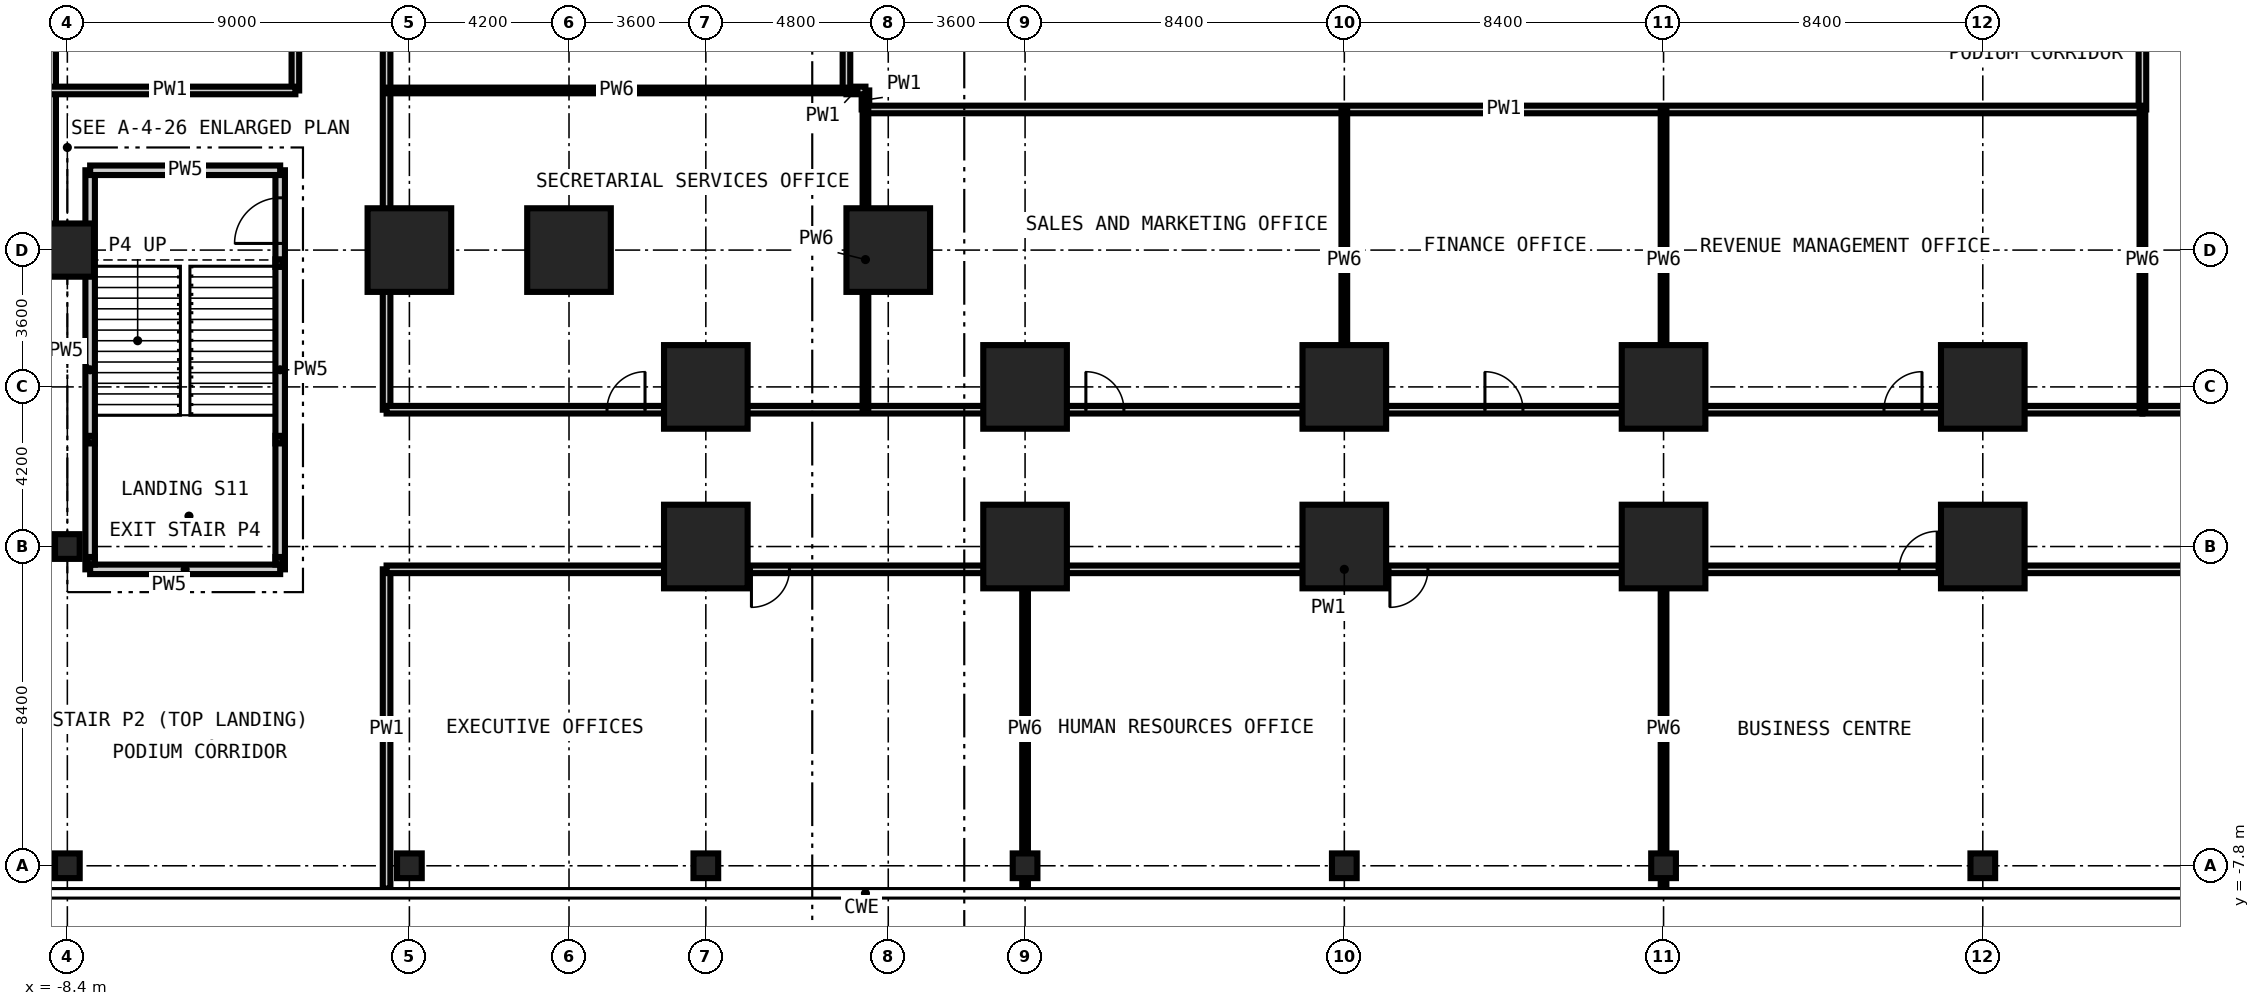
"""IFC4 building model, lengths in metres.
Left out: names, types, materials, properties, quantities, classifications, styles, units other than length and angle.
Written with IfcOpenShell. Run it as: python <this file> out.ifc"""

import sys

from ifc_helpers import new_model, si_unit, direction, frame, frame_2d, origin, origin_with_axes, origin_2d, place, context, subcontext, project, spatial, rectangle, hollow_rectangle, extrude, element, fill, save


model = new_model("IFC4")
c1 = context("Model", 3, precision=1e-05, world=origin(), true_north=direction((0.0, 1.0)))
c2 = subcontext(c1, "Body", "Model", "MODEL_VIEW")
j1 = project(units=[si_unit("LENGTHUNIT", "METRE"), si_unit("PLANEANGLEUNIT", "RADIAN")], contexts=[c1])
p1 = place(None, origin())
s1 = spatial("IfcSite", under=j1, at=p1, CompositionType="ELEMENT")
p2 = place(p1, origin())
s2 = spatial("IfcBuilding", under=s1, at=p2, CompositionType="ELEMENT")
p3 = place(p2, frame((0.0, 0.0, 12.0)))
s3 = spatial("IfcBuildingStorey", under=s2, at=p3, CompositionType="ELEMENT", Elevation=12.0)
for number, where, z_axis, x_axis in (
    (1, (0.6, 8.4, -0.3), (0.0, 0.0, 1.0), (1.0, 0.0, 0.0)),
    (2, (4.8, 8.4, -0.3), (0.0, 0.0, 1.0), (1.0, 0.0, 0.0)),
    (3, (8.4, 0.6, -0.3), (0.0, 0.0, 1.0), (1.0, 0.0, 0.0)),
    (4, (8.4, 4.8, -0.3), (0.0, 0.0, 1.0), (1.0, 0.0, 0.0)),
    (5, (13.2, 8.4, -0.3), (0.0, 0.0, 1.0), (1.0, 0.0, 0.0)),
    (6, (16.8, 0.6, -0.3), (0.0, 0.0, 1.0), (1.0, 0.0, 0.0)),
    (7, (16.8, 4.8, -0.3), (0.0, 0.0, 1.0), (1.0, 0.0, 0.0)),
    (8, (25.2, 0.6, -0.3), (0.0, 0.0, 1.0), (1.0, 0.0, 0.0)),
    (9, (25.2, 4.8, -0.3), (0.0, 0.0, 1.0), (1.0, 0.0, 0.0)),
    (10, (33.6, 0.6, -0.3), (0.0, 0.0, 1.0), (1.0, 0.0, 0.0)),
    (11, (33.6, 4.8, -0.3), (0.0, 0.0, 1.0), (1.0, 0.0, 0.0)),
    (12, (42.0, 0.6, -0.3), (0.0, 0.0, 1.0), (1.0, 0.0, 0.0)),
    (13, (42.0, 4.8, -0.3), (0.0, 0.0, 1.0), (1.0, 0.0, 0.0)),
):
    element("IfcColumn", number, at=place(p3, frame(where, z_axis=z_axis, x_axis=x_axis)), inside=s3, PredefinedType="COLUMN", context=c2, shape_type="SweptSolid", body=[
        extrude(rectangle(XDim=2.2, YDim=2.2, at=origin_2d()), origin(), (0.0, 0.0, 1.0), 5.0),
    ])
for number, where, z_axis, x_axis in (
    (14, (-8.4, -7.8, -0.3), (0.0, 0.0, 1.0), (1.0, 0.0, 0.0)),
    (15, (-8.4, 0.6, -0.3), (0.0, 0.0, 1.0), (1.0, 0.0, 0.0)),
):
    element("IfcColumn", number, at=place(p3, frame(where, z_axis=z_axis, x_axis=x_axis)), inside=s3, PredefinedType="COLUMN", context=c2, shape_type="SweptSolid", body=[
        extrude(rectangle(XDim=0.65, YDim=0.65, at=origin_2d()), origin(), (0.0, 0.0, 1.0), 5.0),
    ])
p4 = place(p3, frame((-8.4, 8.4, -0.3), z_axis=(0.0, 0.0, 1.0), x_axis=(1.0, 0.0, 0.0)))
e16 = element("IfcColumn", 16, at=p4, inside=s3, PredefinedType="COLUMN", context=c2, shape_type="SweptSolid", body=[
    extrude(rectangle(XDim=1.4, YDim=1.4, at=origin_2d()), origin(), (0.0, 0.0, 1.0), 5.0),
])
for number, where, z_axis, x_axis in (
    (17, (0.6, -7.8, -0.3), (0.0, 0.0, 1.0), (1.0, 0.0, 0.0)),
    (18, (8.4, -7.8, -0.3), (0.0, 0.0, 1.0), (1.0, 0.0, 0.0)),
    (19, (16.8, -7.8, -0.3), (0.0, 0.0, 1.0), (1.0, 0.0, 0.0)),
    (20, (25.2, -7.8, -0.3), (0.0, 0.0, 1.0), (1.0, 0.0, 0.0)),
    (21, (33.6, -7.8, -0.3), (0.0, 0.0, 1.0), (1.0, 0.0, 0.0)),
    (22, (42.0, -7.8, -0.3), (0.0, 0.0, 1.0), (1.0, 0.0, 0.0)),
):
    element("IfcColumn", number, at=place(p3, frame(where, z_axis=z_axis, x_axis=x_axis)), inside=s3, PredefinedType="COLUMN", context=c2, shape_type="SweptSolid", body=[
        extrude(rectangle(XDim=0.65, YDim=0.65, at=origin_2d()), origin(), (0.0, 0.0, 1.0), 5.0),
    ])
p5 = place(p3, frame((-8.85, 42.0, 0.0), z_axis=(0.0, 0.0, 1.0), x_axis=(0.0, -1.0, 0.0)))
e23 = element("IfcWall", 23, at=p5, inside=s3, PredefinedType="PARTITIONING", context=c2, shape_type="SweptSolid", body=[
    extrude(rectangle(XDim=33.6, YDim=0.3, at=frame_2d((16.8, 0.0))), origin(), (0.0, 0.0, 1.0), 4.7),
])
p6 = place(p3, frame((0.0, -8.4, 0.0), z_axis=(0.0, 0.0, 1.0), x_axis=(0.0, 1.0, 0.0)))
e24 = element("IfcWall", 24, at=p6, inside=s3, PredefinedType="PARTITIONING", context=c2, shape_type="SweptSolid", body=[
    extrude(rectangle(XDim=8.4, YDim=0.2, at=frame_2d((4.2, 0.0))), origin(), (0.0, 0.0, 1.0), 4.7),
])
p7 = place(p3, frame((0.0, 4.2, 0.0), z_axis=(0.0, 0.0, 1.0), x_axis=(0.0, 1.0, 0.0)))
e25 = element("IfcWall", 25, at=p7, inside=s3, PredefinedType="PARTITIONING", context=c2, shape_type="SweptSolid", body=[
    extrude(rectangle(XDim=33.6, YDim=0.2, at=frame_2d((16.8, 0.0))), origin(), (0.0, 0.0, 1.0), 4.7),
])
p8 = place(p7, frame((13.8, 0.0, 0.0)))
e26 = element("IfcOpeningElement", 26, at=p8, cuts=e25, PredefinedType="OPENING", context=c2, shape_type="SweptSolid", body=[
    extrude(rectangle(XDim=1.8, YDim=2.4, at=frame_2d((0.9, 1.2))), frame((0.0, 0.11, 0.0), z_axis=(0.0, -1.0, 0.0), x_axis=(1.0, 0.0, 0.0)), (0.0, 0.0, 1.0), 0.22),
])
p9 = place(p3, frame((12.6, 12.1, 0.0), z_axis=(0.0, 0.0, 1.0), x_axis=(0.0, 1.0, 0.0)))
e27 = element("IfcWall", 27, at=p9, inside=s3, PredefinedType="PARTITIONING", context=c2, shape_type="SweptSolid", body=[
    extrude(rectangle(XDim=0.5, YDim=0.2, at=frame_2d((0.25, 0.0))), origin(), (0.0, 0.0, 1.0), 4.7),
])
p10 = place(p3, frame((46.2, 12.1, 0.0), z_axis=(0.0, 0.0, 1.0), x_axis=(0.0, 1.0, 0.0)))
e28 = element("IfcWall", 28, at=p10, inside=s3, PredefinedType="PARTITIONING", context=c2, shape_type="SweptSolid", body=[
    extrude(rectangle(XDim=4.7, YDim=0.2, at=frame_2d((2.35, 0.0))), origin(), (0.0, 0.0, 1.0), 4.7),
])
p11 = place(p3, origin_with_axes())
e29 = element("IfcWall", 29, at=p11, inside=s3, PredefinedType="PARTITIONING", context=c2, shape_type="SweptSolid", body=[
    extrude(rectangle(XDim=50.4, YDim=0.2, at=frame_2d((25.2, 0.0))), origin(), (0.0, 0.0, 1.0), 4.7),
])
p12 = place(p11, frame((9.6, 0.0, 0.0)))
e30 = element("IfcOpeningElement", 30, at=p12, cuts=e29, PredefinedType="OPENING", context=c2, shape_type="SweptSolid", body=[
    extrude(rectangle(XDim=1.0, YDim=2.1, at=frame_2d((0.5, 1.05))), frame((0.0, 0.11, 0.0), z_axis=(0.0, -1.0, 0.0), x_axis=(1.0, 0.0, 0.0)), (0.0, 0.0, 1.0), 0.22),
])
p13 = place(p11, frame((26.4, 0.0, 0.0)))
e31 = element("IfcOpeningElement", 31, at=p13, cuts=e29, PredefinedType="OPENING", context=c2, shape_type="SweptSolid", body=[
    extrude(rectangle(XDim=1.0, YDim=2.1, at=frame_2d((0.5, 1.05))), frame((0.0, 0.11, 0.0), z_axis=(0.0, -1.0, 0.0), x_axis=(1.0, 0.0, 0.0)), (0.0, 0.0, 1.0), 0.22),
])
p14 = place(p11, frame((39.8, 0.0, 0.0)))
e32 = element("IfcOpeningElement", 32, at=p14, cuts=e29, PredefinedType="OPENING", context=c2, shape_type="SweptSolid", body=[
    extrude(rectangle(XDim=1.0, YDim=2.1, at=frame_2d((0.5, 1.05))), frame((0.0, 0.11, 0.0), z_axis=(0.0, -1.0, 0.0), x_axis=(1.0, 0.0, 0.0)), (0.0, 0.0, 1.0), 0.22),
])
p15 = place(p3, frame((0.0, 4.2, 0.0), z_axis=(0.0, 0.0, 1.0), x_axis=(1.0, 0.0, 0.0)))
e33 = element("IfcWall", 33, at=p15, inside=s3, PredefinedType="PARTITIONING", context=c2, shape_type="SweptSolid", body=[
    extrude(rectangle(XDim=46.2, YDim=0.2, at=frame_2d((23.1, 0.0))), origin(), (0.0, 0.0, 1.0), 4.7),
])
p16 = place(p15, frame((5.8, 0.0, 0.0)))
e34 = element("IfcOpeningElement", 34, at=p16, cuts=e33, PredefinedType="OPENING", context=c2, shape_type="SweptSolid", body=[
    extrude(rectangle(XDim=1.0, YDim=2.1, at=frame_2d((0.5, 1.05))), frame((0.0, 0.11, 0.0), z_axis=(0.0, -1.0, 0.0), x_axis=(1.0, 0.0, 0.0)), (0.0, 0.0, 1.0), 0.22),
])
p17 = place(p15, frame((18.4, 0.0, 0.0)))
e35 = element("IfcOpeningElement", 35, at=p17, cuts=e33, PredefinedType="OPENING", context=c2, shape_type="SweptSolid", body=[
    extrude(rectangle(XDim=1.0, YDim=2.1, at=frame_2d((0.5, 1.05))), frame((0.0, 0.11, 0.0), z_axis=(0.0, -1.0, 0.0), x_axis=(1.0, 0.0, 0.0)), (0.0, 0.0, 1.0), 0.22),
])
p18 = place(p15, frame((28.9, 0.0, 0.0)))
e36 = element("IfcOpeningElement", 36, at=p18, cuts=e33, PredefinedType="OPENING", context=c2, shape_type="SweptSolid", body=[
    extrude(rectangle(XDim=1.0, YDim=2.1, at=frame_2d((0.5, 1.05))), frame((0.0, 0.11, 0.0), z_axis=(0.0, -1.0, 0.0), x_axis=(1.0, 0.0, 0.0)), (0.0, 0.0, 1.0), 0.22),
])
p19 = place(p15, frame((39.4, 0.0, 0.0)))
e37 = element("IfcOpeningElement", 37, at=p19, cuts=e33, PredefinedType="OPENING", context=c2, shape_type="SweptSolid", body=[
    extrude(rectangle(XDim=1.0, YDim=2.1, at=frame_2d((0.5, 1.05))), frame((0.0, 0.11, 0.0), z_axis=(0.0, -1.0, 0.0), x_axis=(1.0, 0.0, 0.0)), (0.0, 0.0, 1.0), 0.22),
])
p20 = place(p3, frame((12.6, 12.1, 0.0), z_axis=(0.0, 0.0, 1.0), x_axis=(1.0, 0.0, 0.0)))
e38 = element("IfcWall", 38, at=p20, inside=s3, PredefinedType="PARTITIONING", context=c2, shape_type="SweptSolid", body=[
    extrude(rectangle(XDim=33.6, YDim=0.2, at=frame_2d((16.8, 0.0))), origin(), (0.0, 0.0, 1.0), 4.7),
])
p21 = place(p3, frame((12.1, 12.6, 0.0), z_axis=(0.0, 0.0, 1.0), x_axis=(1.0, 0.0, 0.0)))
e39 = element("IfcWall", 39, at=p21, inside=s3, PredefinedType="PARTITIONING", context=c2, shape_type="SweptSolid", body=[
    extrude(rectangle(XDim=0.5, YDim=0.2, at=frame_2d((0.25, 0.0))), origin(), (0.0, 0.0, 1.0), 4.7),
])
p22 = place(p3, frame((-2.4, 25.2, 0.0), z_axis=(0.0, 0.0, 1.0), x_axis=(0.0, -1.0, 0.0)))
e40 = element("IfcWall", 40, at=p22, inside=s3, PredefinedType="PARTITIONING", context=c2, shape_type="SweptSolid", body=[
    extrude(rectangle(XDim=12.6, YDim=0.2, at=frame_2d((6.3, 0.0))), origin(), (0.0, 0.0, 1.0), 4.7),
])
p23 = place(p22, frame((5.8, 0.0, 0.0)))
e41 = element("IfcOpeningElement", 41, at=p23, cuts=e40, PredefinedType="OPENING", context=c2, shape_type="SweptSolid", body=[
    extrude(rectangle(XDim=1.0, YDim=2.1, at=frame_2d((0.5, 1.05))), frame((0.0, 0.11, 0.0), z_axis=(0.0, -1.0, 0.0), x_axis=(1.0, 0.0, 0.0)), (0.0, 0.0, 1.0), 0.22),
])
p24 = place(p3, frame((12.1, 37.8, 0.0), z_axis=(0.0, 0.0, 1.0), x_axis=(0.0, -1.0, 0.0)))
e42 = element("IfcWall", 42, at=p24, inside=s3, PredefinedType="PARTITIONING", context=c2, shape_type="SweptSolid", body=[
    extrude(rectangle(XDim=25.2, YDim=0.2, at=frame_2d((12.6, 0.0))), origin(), (0.0, 0.0, 1.0), 4.7),
])
p25 = place(p24, frame((5.4, 0.0, 0.0)))
e43 = element("IfcOpeningElement", 43, at=p25, cuts=e42, PredefinedType="OPENING", context=c2, shape_type="SweptSolid", body=[
    extrude(rectangle(XDim=1.8, YDim=2.4, at=frame_2d((0.9, 1.2))), frame((0.0, 0.11, 0.0), z_axis=(0.0, -1.0, 0.0), x_axis=(1.0, 0.0, 0.0)), (0.0, 0.0, 1.0), 0.22),
])
p26 = place(p3, frame((58.8, 4.2, 0.0), z_axis=(0.0, 0.0, 1.0), x_axis=(-1.0, 0.0, 0.0)))
e44 = element("IfcWall", 44, at=p26, inside=s3, PredefinedType="PARTITIONING", context=c2, shape_type="SweptSolid", body=[
    extrude(rectangle(XDim=12.6, YDim=0.2, at=frame_2d((6.3, 0.0))), origin(), (0.0, 0.0, 1.0), 4.7),
])
p27 = place(p26, frame((5.4, 0.0, 0.0)))
e45 = element("IfcOpeningElement", 45, at=p27, cuts=e44, PredefinedType="OPENING", context=c2, shape_type="SweptSolid", body=[
    extrude(rectangle(XDim=1.8, YDim=2.4, at=frame_2d((0.9, 1.2))), frame((0.0, 0.11, 0.0), z_axis=(0.0, -1.0, 0.0), x_axis=(1.0, 0.0, 0.0)), (0.0, 0.0, 1.0), 0.22),
])
p28 = place(p3, frame((-2.4, 12.6, 0.0), z_axis=(0.0, 0.0, 1.0), x_axis=(-1.0, 0.0, 0.0)))
e46 = element("IfcWall", 46, at=p28, inside=s3, PredefinedType="PARTITIONING", context=c2, shape_type="SweptSolid", body=[
    extrude(rectangle(XDim=6.6, YDim=0.2, at=frame_2d((3.3, 0.0))), origin(), (0.0, 0.0, 1.0), 4.7),
])
p29 = place(p3, frame((12.6, 4.2, 0.0), z_axis=(0.0, 0.0, 1.0), x_axis=(0.0, 1.0, 0.0)))
e47 = element("IfcWall", 47, at=p29, inside=s3, PredefinedType="PARTITIONING", context=c2, shape_type="SweptSolid", body=[
    extrude(rectangle(XDim=7.9, YDim=0.15, at=frame_2d((3.95, 0.0))), origin(), (0.0, 0.0, 1.0), 4.7),
])
p30 = place(p3, frame((16.8, -8.4, 0.0), z_axis=(0.0, 0.0, 1.0), x_axis=(0.0, 1.0, 0.0)))
e48 = element("IfcWall", 48, at=p30, inside=s3, PredefinedType="PARTITIONING", context=c2, shape_type="SweptSolid", body=[
    extrude(rectangle(XDim=8.4, YDim=0.15, at=frame_2d((4.2, 0.0))), origin(), (0.0, 0.0, 1.0), 4.7),
])
p31 = place(p3, frame((25.2, 4.2, 0.0), z_axis=(0.0, 0.0, 1.0), x_axis=(0.0, 1.0, 0.0)))
e49 = element("IfcWall", 49, at=p31, inside=s3, PredefinedType="PARTITIONING", context=c2, shape_type="SweptSolid", body=[
    extrude(rectangle(XDim=7.9, YDim=0.15, at=frame_2d((3.95, 0.0))), origin(), (0.0, 0.0, 1.0), 4.7),
])
p32 = place(p3, frame((33.6, -8.4, 0.0), z_axis=(0.0, 0.0, 1.0), x_axis=(0.0, 1.0, 0.0)))
e50 = element("IfcWall", 50, at=p32, inside=s3, PredefinedType="PARTITIONING", context=c2, shape_type="SweptSolid", body=[
    extrude(rectangle(XDim=8.4, YDim=0.15, at=frame_2d((4.2, 0.0))), origin(), (0.0, 0.0, 1.0), 4.7),
])
for number, where, z_axis, x_axis in (
    (51, (33.6, 4.2, 0.0), (0.0, 0.0, 1.0), (0.0, 1.0, 0.0)),
    (52, (46.2, 4.2, 0.0), (0.0, 0.0, 1.0), (0.0, 1.0, 0.0)),
):
    element("IfcWall", number, at=place(p3, frame(where, z_axis=z_axis, x_axis=x_axis)), inside=s3, PredefinedType="PARTITIONING", context=c2, shape_type="SweptSolid", body=[
        extrude(rectangle(XDim=7.9, YDim=0.15, at=frame_2d((3.95, 0.0))), origin(), (0.0, 0.0, 1.0), 4.7),
    ])
p33 = place(p3, frame((0.0, 12.6, 0.0), z_axis=(0.0, 0.0, 1.0), x_axis=(1.0, 0.0, 0.0)))
e53 = element("IfcWall", 53, at=p33, inside=s3, PredefinedType="PARTITIONING", context=c2, shape_type="SweptSolid", body=[
    extrude(rectangle(XDim=12.1, YDim=0.15, at=frame_2d((6.05, 0.0))), origin(), (0.0, 0.0, 1.0), 4.7),
])
p34 = place(p3, frame((-7.8, 0.0, 0.0), z_axis=(0.0, 0.0, 1.0), x_axis=(0.0, 1.0, 0.0)))
e54 = element("IfcWall", 54, at=p34, inside=s3, PredefinedType="PARTITIONING", context=c2, shape_type="SweptSolid", body=[
    extrude(rectangle(XDim=10.5, YDim=0.25, at=frame_2d((5.25, 0.0))), origin(), (0.0, 0.0, 1.0), 4.7),
])
p35 = place(p3, frame((-2.8, 0.0, 0.0), z_axis=(0.0, 0.0, 1.0), x_axis=(0.0, 1.0, 0.0)))
e55 = element("IfcWall", 55, at=p35, inside=s3, PredefinedType="PARTITIONING", context=c2, shape_type="SweptSolid", body=[
    extrude(rectangle(XDim=10.5, YDim=0.25, at=frame_2d((5.25, 0.0))), origin(), (0.0, 0.0, 1.0), 4.7),
])
p36 = place(p35, frame((8.575, 0.0, 0.0)))
e56 = element("IfcOpeningElement", 56, at=p36, cuts=e55, PredefinedType="OPENING", context=c2, shape_type="SweptSolid", body=[
    extrude(rectangle(XDim=1.2, YDim=2.2, at=frame_2d((0.6, 1.1))), frame((0.0, 0.135, 0.0), z_axis=(0.0, -1.0, 0.0), x_axis=(1.0, 0.0, 0.0)), (0.0, 0.0, 1.0), 0.27),
])
for number, where, z_axis, x_axis in (
    (57, (-7.8, 0.0, 0.0), (0.0, 0.0, 1.0), (1.0, 0.0, 0.0)),
    (58, (-7.8, 10.5, 0.0), (0.0, 0.0, 1.0), (1.0, 0.0, 0.0)),
):
    element("IfcWall", number, at=place(p3, frame(where, z_axis=z_axis, x_axis=x_axis)), inside=s3, PredefinedType="PARTITIONING", context=c2, shape_type="SweptSolid", body=[
        extrude(rectangle(XDim=5.0, YDim=0.25, at=frame_2d((2.5, 0.0))), origin(), (0.0, 0.0, 1.0), 4.7),
    ])
for number, where, z_axis, x_axis in (
    (59, (-2.825, 8.058, -0.3), (0.0, 0.0, 1.0), (1.0, 0.0, 0.0)),
    (60, (-7.775, 3.413, -0.3), (0.0, 0.0, 1.0), (1.0, 0.0, 0.0)),
    (61, (-2.825, 3.413, -0.3), (0.0, 0.0, 1.0), (1.0, 0.0, 0.0)),
    (62, (-7.775, 0.225, -0.3), (0.0, 0.0, 1.0), (1.0, 0.0, 0.0)),
    (63, (-2.825, 0.225, -0.3), (0.0, 0.0, 1.0), (1.0, 0.0, 0.0)),
):
    element("IfcColumn", number, at=place(p3, frame(where, z_axis=z_axis, x_axis=x_axis)), inside=s3, PredefinedType="COLUMN", context=c2, shape_type="SweptSolid", body=[
        extrude(hollow_rectangle(XDim=0.2, YDim=0.2, WallThickness=0.01, at=origin_2d()), origin(), (0.0, 0.0, 1.0), 5.0),
    ])
p37 = place(p36, origin())
e64 = element("IfcDoor", 64, at=p37, inside=s3, OperationType="SINGLE_SWING_LEFT", PredefinedType="DOOR", context=c2, shape_type="SweptSolid", body=[
    extrude(rectangle(XDim=1.2, YDim=2.2, at=frame_2d((0.6, 1.1))), frame((0.0, 0.025, 0.0), z_axis=(0.0, -1.0, 0.0), x_axis=(1.0, 0.0, 0.0)), (0.0, 0.0, 1.0), 0.05),
])
fill(e56, e64)
p38 = place(p12, frame((1.0, 0.0, 0.0), z_axis=(0.0, 0.0, 1.0), x_axis=(-1.0, 0.0, 0.0)))
e65 = element("IfcDoor", 65, at=p38, inside=s3, OperationType="SINGLE_SWING_RIGHT", PredefinedType="DOOR", context=c2, shape_type="SweptSolid", body=[
    extrude(rectangle(XDim=1.0, YDim=2.1, at=frame_2d((0.5, 1.05))), frame((0.0, 0.025, 0.0), z_axis=(0.0, -1.0, 0.0), x_axis=(1.0, 0.0, 0.0)), (0.0, 0.0, 1.0), 0.05),
])
fill(e30, e65)
p39 = place(p13, frame((1.0, 0.0, 0.0), z_axis=(0.0, 0.0, 1.0), x_axis=(-1.0, 0.0, 0.0)))
e66 = element("IfcDoor", 66, at=p39, inside=s3, OperationType="SINGLE_SWING_RIGHT", PredefinedType="DOOR", context=c2, shape_type="SweptSolid", body=[
    extrude(rectangle(XDim=1.0, YDim=2.1, at=frame_2d((0.5, 1.05))), frame((0.0, 0.025, 0.0), z_axis=(0.0, -1.0, 0.0), x_axis=(1.0, 0.0, 0.0)), (0.0, 0.0, 1.0), 0.05),
])
fill(e31, e66)
p40 = place(p14, origin())
e67 = element("IfcDoor", 67, at=p40, inside=s3, OperationType="SINGLE_SWING_RIGHT", PredefinedType="DOOR", context=c2, shape_type="SweptSolid", body=[
    extrude(rectangle(XDim=1.0, YDim=2.1, at=frame_2d((0.5, 1.05))), frame((0.0, 0.025, 0.0), z_axis=(0.0, -1.0, 0.0), x_axis=(1.0, 0.0, 0.0)), (0.0, 0.0, 1.0), 0.05),
])
fill(e32, e67)
p41 = place(p16, origin())
e68 = element("IfcDoor", 68, at=p41, inside=s3, OperationType="SINGLE_SWING_RIGHT", PredefinedType="DOOR", context=c2, shape_type="SweptSolid", body=[
    extrude(rectangle(XDim=1.0, YDim=2.1, at=frame_2d((0.5, 1.05))), frame((0.0, 0.025, 0.0), z_axis=(0.0, -1.0, 0.0), x_axis=(1.0, 0.0, 0.0)), (0.0, 0.0, 1.0), 0.05),
])
fill(e34, e68)
p42 = place(p17, origin())
e69 = element("IfcDoor", 69, at=p42, inside=s3, OperationType="SINGLE_SWING_LEFT", PredefinedType="DOOR", context=c2, shape_type="SweptSolid", body=[
    extrude(rectangle(XDim=1.0, YDim=2.1, at=frame_2d((0.5, 1.05))), frame((0.0, 0.025, 0.0), z_axis=(0.0, -1.0, 0.0), x_axis=(1.0, 0.0, 0.0)), (0.0, 0.0, 1.0), 0.05),
])
fill(e35, e69)
p43 = place(p18, origin())
e70 = element("IfcDoor", 70, at=p43, inside=s3, OperationType="SINGLE_SWING_LEFT", PredefinedType="DOOR", context=c2, shape_type="SweptSolid", body=[
    extrude(rectangle(XDim=1.0, YDim=2.1, at=frame_2d((0.5, 1.05))), frame((0.0, 0.025, 0.0), z_axis=(0.0, -1.0, 0.0), x_axis=(1.0, 0.0, 0.0)), (0.0, 0.0, 1.0), 0.05),
])
fill(e36, e70)
p44 = place(p19, origin())
e71 = element("IfcDoor", 71, at=p44, inside=s3, OperationType="SINGLE_SWING_RIGHT", PredefinedType="DOOR", context=c2, shape_type="SweptSolid", body=[
    extrude(rectangle(XDim=1.0, YDim=2.1, at=frame_2d((0.5, 1.05))), frame((0.0, 0.025, 0.0), z_axis=(0.0, -1.0, 0.0), x_axis=(1.0, 0.0, 0.0)), (0.0, 0.0, 1.0), 0.05),
])
fill(e37, e71)
save(model, sys.argv[1])
